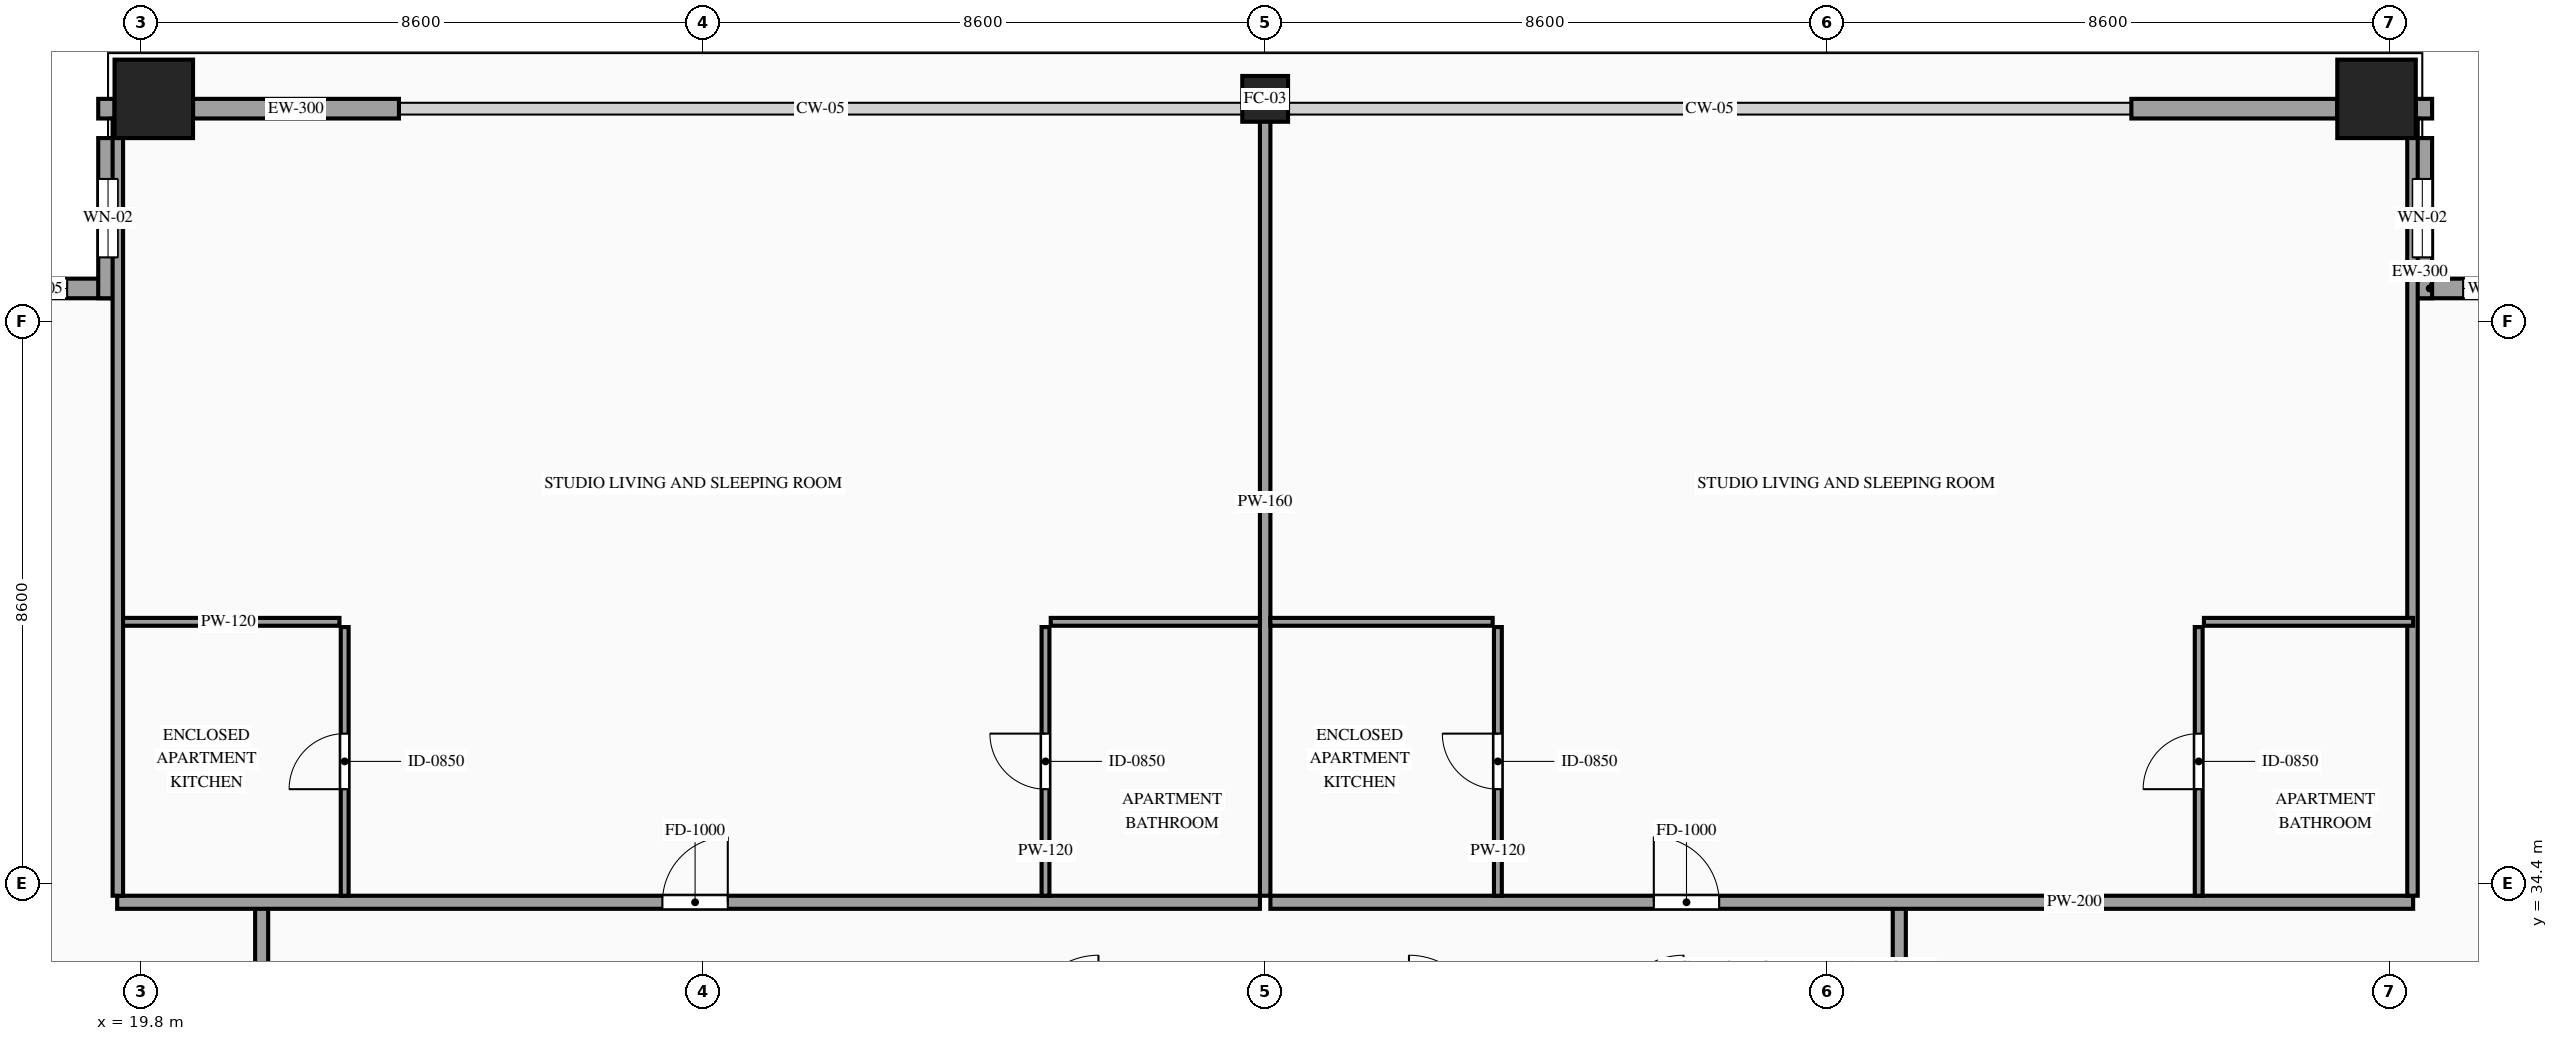
"""IFC4 building model, lengths in metres.
Left out: names, types, materials, properties, quantities, classifications, styles, units other than length and angle.
Written with IfcOpenShell. Run it as: python <this file> out.ifc"""

import sys

from ifc_helpers import new_model, si_unit, direction, frame, frame_2d, origin, origin_2d, place, context, subcontext, project, spatial, rectangle, hollow_rectangle, extrude, source, transform, mapped, element, fill, save


model = new_model("IFC4")
c1 = context("Model", 3, precision=1e-05, world=origin(), true_north=direction((0.0, 1.0)))
c2 = subcontext(c1, "Body", "Model", "MODEL_VIEW")
j1 = project(units=[si_unit("LENGTHUNIT", "METRE"), si_unit("PLANEANGLEUNIT", "RADIAN")], contexts=[c1])
p1 = place(None, origin())
s1 = spatial("IfcSite", under=j1, at=p1, CompositionType="ELEMENT")
p2 = place(p1, origin())
s2 = spatial("IfcBuilding", under=s1, at=p2, CompositionType="ELEMENT")
p3 = place(p2, frame((0.0, 0.0, 275.1)))
s3 = spatial("IfcBuildingStorey", under=s2, at=p3, CompositionType="ELEMENT", Elevation=275.1)
m1 = source(origin(), c2, "Body", "SweptSolid", [
    extrude(hollow_rectangle(XDim=1.2, YDim=1.2, WallThickness=0.055, at=origin_2d()), origin(), (0.0, 0.0, 1.0), 3.5),
])
p4 = place(p3, frame((20.0, 46.4, 0.0), z_axis=(0.0, 0.0, 1.0), x_axis=(1.0, 0.0, 0.0)))
e1 = element("IfcColumn", 1, at=p4, inside=s3, PredefinedType="COLUMN", context=c2, shape_type="MappedRepresentation", body=[
    mapped(m1, transform((0.0, 0.0, 0.0), scale=1.0)),
])
m2 = source(origin(), c2, "Body", "SweptSolid", [
    extrude(hollow_rectangle(XDim=0.7, YDim=0.7, WallThickness=0.032, at=origin_2d()), origin(), (0.0, 0.0, 1.0), 3.5),
])
p5 = place(p3, frame((37.0, 46.4, 0.0), z_axis=(0.0, 0.0, 1.0), x_axis=(1.0, 0.0, 0.0)))
e2 = element("IfcColumn", 2, at=p5, inside=s3, PredefinedType="COLUMN", context=c2, shape_type="MappedRepresentation", body=[
    mapped(m2, transform((0.0, 0.0, 0.0), scale=1.0)),
])
p6 = place(p3, frame((54.0, 46.4, 0.0), z_axis=(0.0, 0.0, 1.0), x_axis=(1.0, 0.0, 0.0)))
e3 = element("IfcColumn", 3, at=p6, inside=s3, PredefinedType="COLUMN", context=c2, shape_type="MappedRepresentation", body=[
    mapped(m1, transform((0.0, 0.0, 0.0), scale=1.0)),
])
p7 = place(p3, frame((19.45, 43.5, 0.0), z_axis=(0.0, 0.0, 1.0), x_axis=(-1.0, 0.0, 0.0)))
e4 = element("IfcWall", 4, at=p7, inside=s3, PredefinedType="SOLIDWALL", context=c2, shape_type="SweptSolid", body=[
    extrude(rectangle(XDim=2.45, YDim=0.3, at=frame_2d((1.225, 0.0))), origin(), (0.0, 0.0, 1.0), 3.28),
])
p8 = place(p7, frame((0.775, 0.0, 0.85)))
e5 = element("IfcOpeningElement", 5, at=p8, cuts=e4, PredefinedType="OPENING", context=c2, shape_type="SweptSolid", body=[
    extrude(rectangle(XDim=0.9, YDim=1.5, at=frame_2d((0.45, 0.75))), frame((0.0, 0.165, 0.0), z_axis=(0.0, -1.0, 0.0), x_axis=(1.0, 0.0, 0.0)), (0.0, 0.0, 1.0), 0.33),
])
p9 = place(p3, frame((19.3, 45.8, 0.0), z_axis=(0.0, 0.0, 1.0), x_axis=(0.0, -1.0, 0.0)))
e6 = element("IfcWall", 6, at=p9, inside=s3, PredefinedType="SOLIDWALL", context=c2, shape_type="SweptSolid", body=[
    extrude(rectangle(XDim=2.45, YDim=0.3, at=frame_2d((1.225, 0.0))), origin(), (0.0, 0.0, 1.0), 3.28),
])
p10 = place(p9, frame((0.625, 0.0, 0.85)))
e7 = element("IfcOpeningElement", 7, at=p10, cuts=e6, PredefinedType="OPENING", context=c2, shape_type="SweptSolid", body=[
    extrude(rectangle(XDim=1.2, YDim=2.1, at=frame_2d((0.6, 1.05))), frame((0.0, 0.165, 0.0), z_axis=(0.0, -1.0, 0.0), x_axis=(1.0, 0.0, 0.0)), (0.0, 0.0, 1.0), 0.33),
])
p11 = place(p3, frame((57.0, 43.5, 0.0), z_axis=(0.0, 0.0, 1.0), x_axis=(-1.0, 0.0, 0.0)))
e8 = element("IfcWall", 8, at=p11, inside=s3, PredefinedType="SOLIDWALL", context=c2, shape_type="SweptSolid", body=[
    extrude(rectangle(XDim=2.45, YDim=0.3, at=frame_2d((1.225, 0.0))), origin(), (0.0, 0.0, 1.0), 3.28),
])
p12 = place(p11, frame((0.775, 0.0, 0.85)))
e9 = element("IfcOpeningElement", 9, at=p12, cuts=e8, PredefinedType="OPENING", context=c2, shape_type="SweptSolid", body=[
    extrude(rectangle(XDim=0.9, YDim=1.5, at=frame_2d((0.45, 0.75))), frame((0.0, 0.165, 0.0), z_axis=(0.0, -1.0, 0.0), x_axis=(1.0, 0.0, 0.0)), (0.0, 0.0, 1.0), 0.33),
])
p13 = place(p3, frame((54.7, 43.35, 0.0), z_axis=(0.0, 0.0, 1.0), x_axis=(0.0, 1.0, 0.0)))
e10 = element("IfcWall", 10, at=p13, inside=s3, PredefinedType="SOLIDWALL", context=c2, shape_type="SweptSolid", body=[
    extrude(rectangle(XDim=2.45, YDim=0.3, at=frame_2d((1.225, 0.0))), origin(), (0.0, 0.0, 1.0), 3.28),
])
p14 = place(p13, frame((0.625, 0.0, 0.85)))
e11 = element("IfcOpeningElement", 11, at=p14, cuts=e10, PredefinedType="OPENING", context=c2, shape_type="SweptSolid", body=[
    extrude(rectangle(XDim=1.2, YDim=2.1, at=frame_2d((0.6, 1.05))), frame((0.0, 0.165, 0.0), z_axis=(0.0, -1.0, 0.0), x_axis=(1.0, 0.0, 0.0)), (0.0, 0.0, 1.0), 0.33),
])
m3 = source(origin(), c2, "Body", "SweptSolid", [
    extrude(rectangle(XDim=0.25, YDim=0.3, at=frame_2d((0.125, 0.0))), origin(), (0.0, 0.0, 1.0), 3.28),
])
for number, where, z_axis, x_axis in (
    (12, (19.15, 46.25, 0.0), (0.0, 0.0, 1.0), (1.0, 0.0, 0.0)),
    (13, (54.6, 46.25, 0.0), (0.0, 0.0, 1.0), (1.0, 0.0, 0.0)),
):
    element("IfcWall", number, at=place(p3, frame(where, z_axis=z_axis, x_axis=x_axis)), inside=s3, PredefinedType="SOLIDWALL", context=c2, shape_type="MappedRepresentation", body=[
        mapped(m3, transform((0.0, 0.0, 0.0), scale=1.0)),
    ])
m4 = source(origin(), c2, "Body", "SweptSolid", [
    extrude(rectangle(XDim=3.15, YDim=0.3, at=frame_2d((1.575, 0.0))), origin(), (0.0, 0.0, 1.0), 2.835),
])
for number, where, z_axis, x_axis in (
    (14, (20.6, 46.25, 0.0), (0.0, 0.0, 1.0), (1.0, 0.0, 0.0)),
    (15, (50.25, 46.25, 0.0), (0.0, 0.0, 1.0), (1.0, 0.0, 0.0)),
):
    element("IfcWall", number, at=place(p3, frame(where, z_axis=z_axis, x_axis=x_axis)), inside=s3, PredefinedType="SOLIDWALL", context=c2, shape_type="MappedRepresentation", body=[
        mapped(m4, transform((0.0, 0.0, 0.0), scale=1.0)),
    ])
m5 = source(origin(), c2, "Body", "SweptSolid", [
    extrude(rectangle(XDim=1.7, YDim=0.2, at=frame_2d((0.85, 0.0))), origin(), (0.0, 0.0, 1.0), 3.28),
])
for number, where, z_axis, x_axis in (
    (16, (21.65, 32.35, 0.0), (0.0, 0.0, 1.0), (0.0, 1.0, 0.0)),
    (17, (46.7, 32.35, 0.0), (0.0, 0.0, 1.0), (0.0, 1.0, 0.0)),
):
    element("IfcWall", number, at=place(p3, frame(where, z_axis=z_axis, x_axis=x_axis)), inside=s3, PredefinedType="PARTITIONING", context=c2, shape_type="MappedRepresentation", body=[
        mapped(m5, transform((0.0, 0.0, 0.0), scale=1.0)),
    ])
p15 = place(p3, frame((19.44, 34.11, 0.0), z_axis=(0.0, 0.0, 1.0), x_axis=(1.0, 0.0, 0.0)))
e18 = element("IfcWall", 18, at=p15, inside=s3, PredefinedType="PARTITIONING", context=c2, shape_type="SweptSolid", body=[
    extrude(rectangle(XDim=17.48, YDim=0.2, at=frame_2d((8.74, 0.0))), origin(), (0.0, 0.0, 1.0), 3.28),
])
p16 = place(p15, frame((8.34, 0.0, 0.0)))
e19 = element("IfcOpeningElement", 19, at=p16, cuts=e18, PredefinedType="OPENING", context=c2, shape_type="SweptSolid", body=[
    extrude(rectangle(XDim=1.0, YDim=2.2, at=frame_2d((0.5, 1.1))), frame((0.0, 0.115, 0.0), z_axis=(0.0, -1.0, 0.0), x_axis=(1.0, 0.0, 0.0)), (0.0, 0.0, 1.0), 0.23),
])
m6 = source(origin(), c2, "Body", "SweptSolid", [
    extrude(rectangle(XDim=12.04, YDim=0.16, at=frame_2d((6.02, 0.0))), origin(), (0.0, 0.0, 1.0), 2.787),
])
p17 = place(p3, frame((37.0, 34.21, 0.0), z_axis=(0.0, 0.0, 1.0), x_axis=(0.0, 1.0, 0.0)))
e20 = element("IfcWall", 20, at=p17, inside=s3, PredefinedType="PARTITIONING", context=c2, shape_type="MappedRepresentation", body=[
    mapped(m6, transform((0.0, 0.0, 0.0), scale=1.0)),
])
m7 = source(origin(), c2, "Body", "SweptSolid", [
    extrude(rectangle(XDim=3.4, YDim=0.12, at=frame_2d((1.7, 0.0))), origin(), (0.0, 0.0, 1.0), 3.28),
])
p18 = place(p3, frame((19.44, 38.4, 0.0), z_axis=(0.0, 0.0, 1.0), x_axis=(1.0, 0.0, 0.0)))
e21 = element("IfcWall", 21, at=p18, inside=s3, PredefinedType="PARTITIONING", context=c2, shape_type="MappedRepresentation", body=[
    mapped(m7, transform((0.0, 0.0, 0.0), scale=1.0)),
])
p19 = place(p3, frame((22.92, 34.21, 0.0), z_axis=(0.0, 0.0, 1.0), x_axis=(0.0, 1.0, 0.0)))
e22 = element("IfcWall", 22, at=p19, inside=s3, PredefinedType="PARTITIONING", context=c2, shape_type="SweptSolid", body=[
    extrude(rectangle(XDim=4.11, YDim=0.12, at=frame_2d((2.055, 0.0))), origin(), (0.0, 0.0, 1.0), 3.28),
])
p20 = place(p19, frame((1.63, 0.0, 0.0)))
e23 = element("IfcOpeningElement", 23, at=p20, cuts=e22, PredefinedType="OPENING", context=c2, shape_type="SweptSolid", body=[
    extrude(rectangle(XDim=0.85, YDim=2.1, at=frame_2d((0.425, 1.05))), frame((0.0, 0.075, 0.0), z_axis=(0.0, -1.0, 0.0), x_axis=(1.0, 0.0, 0.0)), (0.0, 0.0, 1.0), 0.15),
])
m8 = source(origin(), c2, "Body", "SweptSolid", [
    extrude(rectangle(XDim=3.2, YDim=0.12, at=frame_2d((1.6, 0.0))), origin(), (0.0, 0.0, 1.0), 3.28),
])
p21 = place(p3, frame((33.72, 38.4, 0.0), z_axis=(0.0, 0.0, 1.0), x_axis=(1.0, 0.0, 0.0)))
e24 = element("IfcWall", 24, at=p21, inside=s3, PredefinedType="PARTITIONING", context=c2, shape_type="MappedRepresentation", body=[
    mapped(m8, transform((0.0, 0.0, 0.0), scale=1.0)),
])
p22 = place(p3, frame((33.64, 34.21, 0.0), z_axis=(0.0, 0.0, 1.0), x_axis=(0.0, 1.0, 0.0)))
e25 = element("IfcWall", 25, at=p22, inside=s3, PredefinedType="PARTITIONING", context=c2, shape_type="SweptSolid", body=[
    extrude(rectangle(XDim=4.11, YDim=0.12, at=frame_2d((2.055, 0.0))), origin(), (0.0, 0.0, 1.0), 3.28),
])
p23 = place(p22, frame((1.63, 0.0, 0.0)))
e26 = element("IfcOpeningElement", 26, at=p23, cuts=e25, PredefinedType="OPENING", context=c2, shape_type="SweptSolid", body=[
    extrude(rectangle(XDim=0.85, YDim=2.1, at=frame_2d((0.425, 1.05))), frame((0.0, 0.075, 0.0), z_axis=(0.0, -1.0, 0.0), x_axis=(1.0, 0.0, 0.0)), (0.0, 0.0, 1.0), 0.15),
])
p24 = place(p3, frame((37.08, 34.11, 0.0), z_axis=(0.0, 0.0, 1.0), x_axis=(1.0, 0.0, 0.0)))
e27 = element("IfcWall", 27, at=p24, inside=s3, PredefinedType="PARTITIONING", context=c2, shape_type="SweptSolid", body=[
    extrude(rectangle(XDim=17.48, YDim=0.2, at=frame_2d((8.74, 0.0))), origin(), (0.0, 0.0, 1.0), 3.28),
])
p25 = place(p24, frame((5.865, 0.0, 0.0)))
e28 = element("IfcOpeningElement", 28, at=p25, cuts=e27, PredefinedType="OPENING", context=c2, shape_type="SweptSolid", body=[
    extrude(rectangle(XDim=1.0, YDim=2.2, at=frame_2d((0.5, 1.1))), frame((0.0, 0.115, 0.0), z_axis=(0.0, -1.0, 0.0), x_axis=(1.0, 0.0, 0.0)), (0.0, 0.0, 1.0), 0.23),
])
m9 = source(origin(), c2, "Body", "SweptSolid", [
    extrude(rectangle(XDim=11.89, YDim=0.16, at=frame_2d((5.945, 0.0))), origin(), (0.0, 0.0, 1.0), 3.28),
])
for number, where, z_axis, x_axis in (
    (29, (19.45, 34.21, 0.0), (0.0, 0.0, 1.0), (0.0, 1.0, 0.0)),
    (30, (54.55, 34.21, 0.0), (0.0, 0.0, 1.0), (0.0, 1.0, 0.0)),
):
    element("IfcWall", number, at=place(p3, frame(where, z_axis=z_axis, x_axis=x_axis)), inside=s3, PredefinedType="PARTITIONING", context=c2, shape_type="MappedRepresentation", body=[
        mapped(m9, transform((0.0, 0.0, 0.0), scale=1.0)),
    ])
m10 = source(origin(), c2, "Body", "SweptSolid", [
    extrude(rectangle(XDim=3.4, YDim=0.12, at=frame_2d((1.7, 0.0))), origin(), (0.0, 0.0, 1.0), 3.28),
])
p26 = place(p3, frame((37.08, 38.4, 0.0), z_axis=(0.0, 0.0, 1.0), x_axis=(1.0, 0.0, 0.0)))
e31 = element("IfcWall", 31, at=p26, inside=s3, PredefinedType="PARTITIONING", context=c2, shape_type="MappedRepresentation", body=[
    mapped(m10, transform((0.0, 0.0, 0.0), scale=1.0)),
])
p27 = place(p3, frame((40.56, 34.21, 0.0), z_axis=(0.0, 0.0, 1.0), x_axis=(0.0, 1.0, 0.0)))
e32 = element("IfcWall", 32, at=p27, inside=s3, PredefinedType="PARTITIONING", context=c2, shape_type="SweptSolid", body=[
    extrude(rectangle(XDim=4.11, YDim=0.12, at=frame_2d((2.055, 0.0))), origin(), (0.0, 0.0, 1.0), 3.28),
])
p28 = place(p27, frame((1.63, 0.0, 0.0)))
e33 = element("IfcOpeningElement", 33, at=p28, cuts=e32, PredefinedType="OPENING", context=c2, shape_type="SweptSolid", body=[
    extrude(rectangle(XDim=0.85, YDim=2.1, at=frame_2d((0.425, 1.05))), frame((0.0, 0.075, 0.0), z_axis=(0.0, -1.0, 0.0), x_axis=(1.0, 0.0, 0.0)), (0.0, 0.0, 1.0), 0.15),
])
p29 = place(p3, frame((51.36, 38.4, 0.0), z_axis=(0.0, 0.0, 1.0), x_axis=(1.0, 0.0, 0.0)))
e34 = element("IfcWall", 34, at=p29, inside=s3, PredefinedType="PARTITIONING", context=c2, shape_type="MappedRepresentation", body=[
    mapped(m8, transform((0.0, 0.0, 0.0), scale=1.0)),
])
p30 = place(p3, frame((51.28, 34.21, 0.0), z_axis=(0.0, 0.0, 1.0), x_axis=(0.0, 1.0, 0.0)))
e35 = element("IfcWall", 35, at=p30, inside=s3, PredefinedType="PARTITIONING", context=c2, shape_type="SweptSolid", body=[
    extrude(rectangle(XDim=4.11, YDim=0.12, at=frame_2d((2.055, 0.0))), origin(), (0.0, 0.0, 1.0), 3.28),
])
p31 = place(p30, frame((1.63, 0.0, 0.0)))
e36 = element("IfcOpeningElement", 36, at=p31, cuts=e35, PredefinedType="OPENING", context=c2, shape_type="SweptSolid", body=[
    extrude(rectangle(XDim=0.85, YDim=2.1, at=frame_2d((0.425, 1.05))), frame((0.0, 0.075, 0.0), z_axis=(0.0, -1.0, 0.0), x_axis=(1.0, 0.0, 0.0)), (0.0, 0.0, 1.0), 0.15),
])
m11 = source(origin(), c2, "Body", "SweptSolid", [
    extrude(rectangle(XDim=0.9, YDim=1.5, at=frame_2d((0.45, 0.75))), frame((0.0, 0.03, 0.0), z_axis=(0.0, -1.0, 0.0), x_axis=(1.0, 0.0, 0.0)), (0.0, 0.0, 1.0), 0.06),
])
p32 = place(p8, origin())
e37 = element("IfcWindow", 37, at=p32, inside=s3, PartitioningType="SINGLE_PANEL", PredefinedType="WINDOW", context=c2, shape_type="MappedRepresentation", body=[
    mapped(m11, transform((0.0, 0.0, 0.0), scale=1.0)),
])
fill(e5, e37)
m12 = source(origin(), c2, "Body", "SweptSolid", [
    extrude(rectangle(XDim=1.2, YDim=2.1, at=frame_2d((0.6, 1.05))), frame((0.0, 0.03, 0.0), z_axis=(0.0, -1.0, 0.0), x_axis=(1.0, 0.0, 0.0)), (0.0, 0.0, 1.0), 0.06),
])
p33 = place(p10, origin())
e38 = element("IfcWindow", 38, at=p33, inside=s3, PartitioningType="SINGLE_PANEL", PredefinedType="WINDOW", context=c2, shape_type="MappedRepresentation", body=[
    mapped(m12, transform((0.0, 0.0, 0.0), scale=1.0)),
])
fill(e7, e38)
p34 = place(p12, origin())
e39 = element("IfcWindow", 39, at=p34, inside=s3, PartitioningType="SINGLE_PANEL", PredefinedType="WINDOW", context=c2, shape_type="MappedRepresentation", body=[
    mapped(m11, transform((0.0, 0.0, 0.0), scale=1.0)),
])
fill(e9, e39)
p35 = place(p14, origin())
e40 = element("IfcWindow", 40, at=p35, inside=s3, PartitioningType="SINGLE_PANEL", PredefinedType="WINDOW", context=c2, shape_type="MappedRepresentation", body=[
    mapped(m12, transform((0.0, 0.0, 0.0), scale=1.0)),
])
fill(e11, e40)
m13 = source(origin(), c2, "Body", "SweptSolid", [
    extrude(rectangle(XDim=1.0, YDim=2.2, at=frame_2d((0.5, 1.1))), frame((0.0, 0.025, 0.0), z_axis=(0.0, -1.0, 0.0), x_axis=(1.0, 0.0, 0.0)), (0.0, 0.0, 1.0), 0.05),
])
p36 = place(p16, origin())
e41 = element("IfcDoor", 41, at=p36, inside=s3, OperationType="SINGLE_SWING_RIGHT", PredefinedType="DOOR", context=c2, shape_type="MappedRepresentation", body=[
    mapped(m13, transform((0.0, 0.0, 0.0), scale=1.0)),
])
fill(e19, e41)
m14 = source(origin(), c2, "Body", "SweptSolid", [
    extrude(rectangle(XDim=0.85, YDim=2.1, at=frame_2d((0.425, 1.05))), frame((0.0, 0.025, 0.0), z_axis=(0.0, -1.0, 0.0), x_axis=(1.0, 0.0, 0.0)), (0.0, 0.0, 1.0), 0.05),
])
p37 = place(p20, origin())
e42 = element("IfcDoor", 42, at=p37, inside=s3, OperationType="SINGLE_SWING_LEFT", PredefinedType="DOOR", context=c2, shape_type="MappedRepresentation", body=[
    mapped(m14, transform((0.0, 0.0, 0.0), scale=1.0)),
])
fill(e23, e42)
p38 = place(p23, origin())
e43 = element("IfcDoor", 43, at=p38, inside=s3, OperationType="SINGLE_SWING_RIGHT", PredefinedType="DOOR", context=c2, shape_type="MappedRepresentation", body=[
    mapped(m14, transform((0.0, 0.0, 0.0), scale=1.0)),
])
fill(e26, e43)
p39 = place(p25, origin())
e44 = element("IfcDoor", 44, at=p39, inside=s3, OperationType="SINGLE_SWING_LEFT", PredefinedType="DOOR", context=c2, shape_type="MappedRepresentation", body=[
    mapped(m13, transform((0.0, 0.0, 0.0), scale=1.0)),
])
fill(e28, e44)
p40 = place(p28, origin())
e45 = element("IfcDoor", 45, at=p40, inside=s3, OperationType="SINGLE_SWING_RIGHT", PredefinedType="DOOR", context=c2, shape_type="MappedRepresentation", body=[
    mapped(m14, transform((0.0, 0.0, 0.0), scale=1.0)),
])
fill(e33, e45)
p41 = place(p31, origin())
e46 = element("IfcDoor", 46, at=p41, inside=s3, OperationType="SINGLE_SWING_LEFT", PredefinedType="DOOR", context=c2, shape_type="MappedRepresentation", body=[
    mapped(m14, transform((0.0, 0.0, 0.0), scale=1.0)),
])
fill(e36, e46)
save(model, sys.argv[1])
